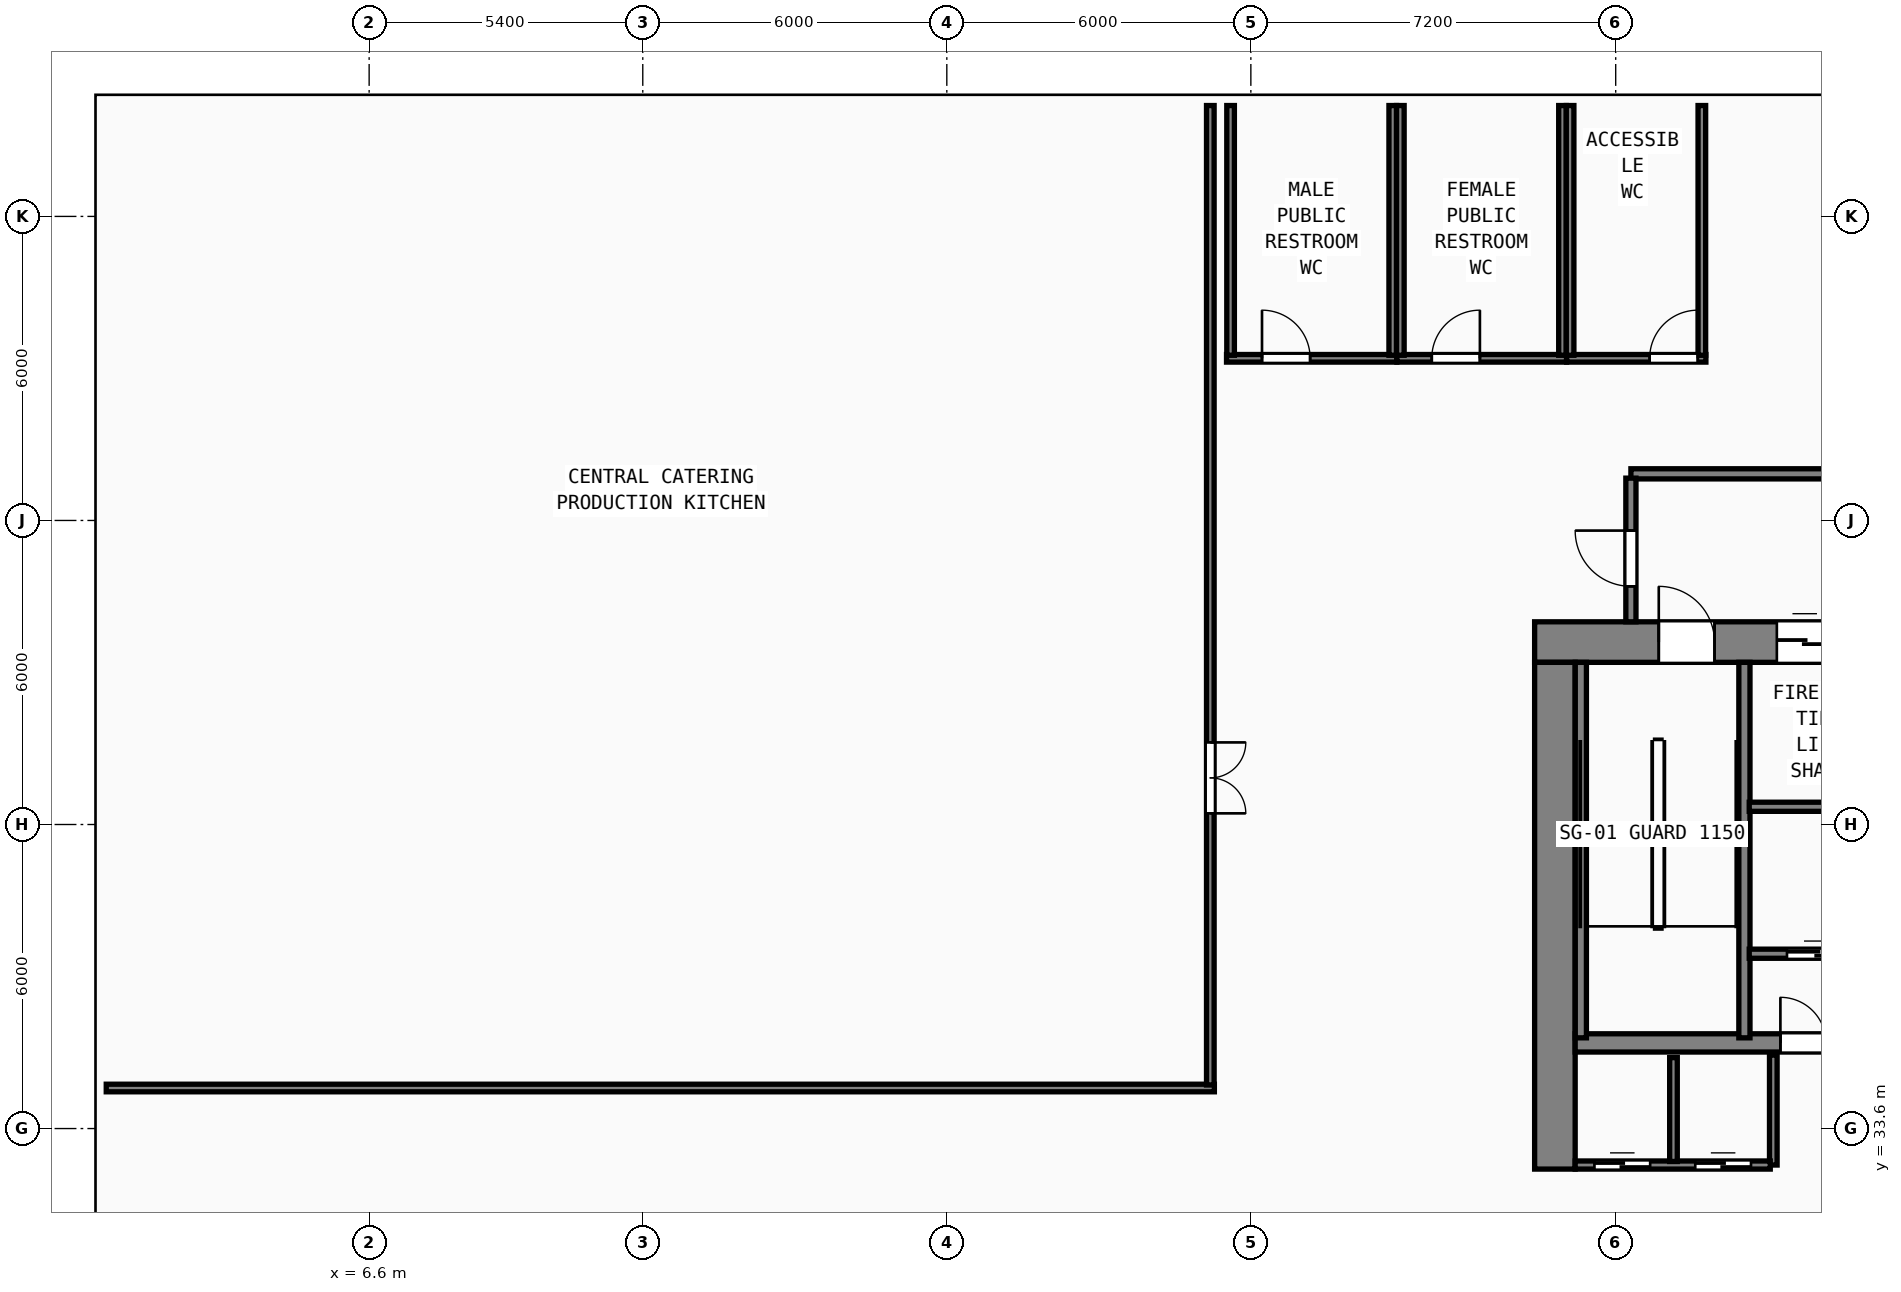
"""IFC4 building model, lengths in metres.
Left out: names, types, materials, properties, quantities, classifications, styles, units other than length and angle.
Written with IfcOpenShell. Run it as: python <this file> out.ifc"""

import sys

from ifc_helpers import new_model, si_unit, direction, frame, frame_2d, origin, origin_2d, place, context, subcontext, project, spatial, rectangle, hollow_rectangle, extrude, element, fill, save


model = new_model("IFC4")
c1 = context("Model", 3, precision=1e-05, world=origin(), true_north=direction((0.0, 1.0)))
c2 = subcontext(c1, "Body", "Model", "MODEL_VIEW")
j1 = project(units=[si_unit("LENGTHUNIT", "METRE"), si_unit("PLANEANGLEUNIT", "RADIAN")], contexts=[c1])
p1 = place(None, origin())
s1 = spatial("IfcSite", under=j1, at=p1, CompositionType="ELEMENT")
p2 = place(p1, origin())
s2 = spatial("IfcBuilding", under=s1, at=p2, CompositionType="ELEMENT")
p3 = place(p2, frame((0.0, 0.0, 5.4)))
s3 = spatial("IfcBuildingStorey", under=s2, at=p3, CompositionType="ELEMENT", Elevation=5.4)
p4 = place(p3, frame((29.6, 43.2, 0.0), z_axis=(0.0, 0.0, 1.0), x_axis=(1.0, 0.0, 0.0)))
e1 = element("IfcWall", 1, at=p4, inside=s3, PredefinedType="SHEAR", context=c2, shape_type="SweptSolid", body=[
    extrude(rectangle(XDim=17.6, YDim=0.8, at=frame_2d((8.8, 0.0))), origin(), (0.0, 0.0, 1.0), 4.56),
])
p5 = place(p4, frame((2.45, 0.0, 0.0)))
e2 = element("IfcOpeningElement", 2, at=p5, cuts=e1, PredefinedType="OPENING", context=c2, shape_type="SweptSolid", body=[
    extrude(rectangle(XDim=1.1, YDim=2.15, at=frame_2d((0.55, 1.075))), frame((0.0, 0.41, 0.0), z_axis=(0.0, -1.0, 0.0), x_axis=(1.0, 0.0, 0.0)), (0.0, 0.0, 1.0), 0.82),
])
p6 = place(p4, frame((7.56, 0.0, 0.0)))
e3 = element("IfcOpeningElement", 3, at=p6, cuts=e1, PredefinedType="OPENING", context=c2, shape_type="SweptSolid", body=[
    extrude(rectangle(XDim=1.1, YDim=2.15, at=frame_2d((0.55, 1.075))), frame((0.0, 0.41, 0.0), z_axis=(0.0, -1.0, 0.0), x_axis=(1.0, 0.0, 0.0)), (0.0, 0.0, 1.0), 0.82),
])
p7 = place(p4, frame((13.65, 0.0, 0.0)))
e4 = element("IfcOpeningElement", 4, at=p7, cuts=e1, PredefinedType="OPENING", context=c2, shape_type="SweptSolid", body=[
    extrude(rectangle(XDim=1.1, YDim=2.15, at=frame_2d((0.55, 1.075))), frame((0.0, 0.41, 0.0), z_axis=(0.0, -1.0, 0.0), x_axis=(1.0, 0.0, 0.0)), (0.0, 0.0, 1.0), 0.82),
])
p8 = place(p4, frame((4.78, 0.0, 0.0)))
e5 = element("IfcOpeningElement", 5, at=p8, cuts=e1, PredefinedType="OPENING", context=c2, shape_type="SweptSolid", body=[
    extrude(rectangle(XDim=1.1, YDim=2.2, at=frame_2d((0.55, 1.1))), frame((0.0, 0.41, 0.0), z_axis=(0.0, -1.0, 0.0), x_axis=(1.0, 0.0, 0.0)), (0.0, 0.0, 1.0), 0.82),
])
p9 = place(p4, frame((11.14, 0.0, 0.0)))
e6 = element("IfcOpeningElement", 6, at=p9, cuts=e1, PredefinedType="OPENING", context=c2, shape_type="SweptSolid", body=[
    extrude(rectangle(XDim=1.1, YDim=2.2, at=frame_2d((0.55, 1.1))), frame((0.0, 0.41, 0.0), z_axis=(0.0, -1.0, 0.0), x_axis=(1.0, 0.0, 0.0)), (0.0, 0.0, 1.0), 0.82),
])
p10 = place(p3, frame((30.0, 32.8, 0.0), z_axis=(0.0, 0.0, 1.0), x_axis=(0.0, 1.0, 0.0)))
e7 = element("IfcWall", 7, at=p10, inside=s3, PredefinedType="SHEAR", context=c2, shape_type="SweptSolid", body=[
    extrude(rectangle(XDim=10.0, YDim=0.8, at=frame_2d((5.0, 0.0))), origin(), (0.0, 0.0, 1.0), 4.56),
])
p11 = place(p3, frame((30.4, 35.29, 0.0), z_axis=(0.0, 0.0, 1.0), x_axis=(1.0, 0.0, 0.0)))
e8 = element("IfcWall", 8, at=p11, inside=s3, PredefinedType="SHEAR", context=c2, shape_type="SweptSolid", body=[
    extrude(rectangle(XDim=16.0, YDim=0.36, at=frame_2d((8.0, 0.0))), origin(), (0.0, 0.0, 1.0), 4.56),
])
p12 = place(p11, frame((4.95, 0.0, 0.0), z_axis=(0.0, 0.0, 1.0), x_axis=(-1.0, 0.0, 0.0)))
e9 = element("IfcOpeningElement", 9, at=p12, cuts=e8, PredefinedType="OPENING", context=c2, shape_type="SweptSolid", body=[
    extrude(rectangle(XDim=0.9, YDim=2.1, at=frame_2d((0.45, 1.05))), frame((0.0, 0.19, 0.0), z_axis=(0.0, -1.0, 0.0), x_axis=(1.0, 0.0, 0.0)), (0.0, 0.0, 1.0), 0.38),
])
p13 = place(p11, frame((12.01, 0.0, 0.0), z_axis=(0.0, 0.0, 1.0), x_axis=(-1.0, 0.0, 0.0)))
e10 = element("IfcOpeningElement", 10, at=p13, cuts=e8, PredefinedType="OPENING", context=c2, shape_type="SweptSolid", body=[
    extrude(rectangle(XDim=0.9, YDim=2.1, at=frame_2d((0.45, 1.05))), frame((0.0, 0.19, 0.0), z_axis=(0.0, -1.0, 0.0), x_axis=(1.0, 0.0, 0.0)), (0.0, 0.0, 1.0), 0.38),
])
for number, where, z_axis, x_axis in (
    (11, (30.512, 35.39, 0.0), (0.0, 0.0, 1.0), (0.0, 1.0, 0.0)),
    (12, (33.74, 35.39, 0.0), (0.0, 0.0, 1.0), (0.0, 1.0, 0.0)),
):
    element("IfcWall", number, at=place(p3, frame(where, z_axis=z_axis, x_axis=x_axis)), inside=s3, PredefinedType="SHEAR", context=c2, shape_type="SweptSolid", body=[
        extrude(rectangle(XDim=7.41, YDim=0.22, at=frame_2d((3.705, 0.0))), origin(), (0.0, 0.0, 1.0), 4.56),
    ])
for number, where, z_axis, x_axis in (
    (13, (24.0, 33.6, 0.0), (0.0, 0.0, 1.0), (1.0, 0.0, 0.0)),
    (14, (24.0, 45.6, 0.0), (0.0, 0.0, 1.0), (1.0, 0.0, 0.0)),
    (15, (31.2, 50.4, 0.0), (0.0, 0.0, 1.0), (1.0, 0.0, 0.0)),
    (16, (12.6, 38.4, 0.0), (0.0, 0.0, 1.0), (1.0, 0.0, 0.0)),
):
    element("IfcColumn", number, at=place(p3, frame(where, z_axis=z_axis, x_axis=x_axis)), inside=s3, PredefinedType="COLUMN", context=c2, shape_type="SweptSolid", body=[
        extrude(hollow_rectangle(XDim=1.3, YDim=1.3, WallThickness=0.048, at=origin_2d()), origin(), (0.0, 0.0, 1.0), 4.8),
    ])
for number, where, z_axis, x_axis in (
    (17, (6.6, 51.6, 0.0), (0.0, 0.0, 1.0), (1.0, 0.0, 0.0)),
    (18, (18.0, 51.6, 0.0), (0.0, 0.0, 1.0), (1.0, 0.0, 0.0)),
):
    element("IfcColumn", number, at=place(p3, frame(where, z_axis=z_axis, x_axis=x_axis)), inside=s3, PredefinedType="COLUMN", context=c2, shape_type="SweptSolid", body=[
        extrude(rectangle(XDim=0.9, YDim=0.9, at=origin_2d()), origin(), (0.0, 0.0, 1.0), 4.8),
    ])
p14 = place(p3, frame((31.5, 46.52, 0.0), z_axis=(0.0, 0.0, 1.0), x_axis=(1.0, 0.0, 0.0)))
e19 = element("IfcWall", 19, at=p14, inside=s3, PredefinedType="SOLIDWALL", context=c2, shape_type="SweptSolid", body=[
    extrude(rectangle(XDim=13.8, YDim=0.2, at=frame_2d((6.9, 0.0))), origin(), (0.0, 0.0, 1.0), 4.56),
])
p15 = place(p3, frame((31.5, 43.6, 0.0), z_axis=(0.0, 0.0, 1.0), x_axis=(0.0, 1.0, 0.0)))
e20 = element("IfcWall", 20, at=p15, inside=s3, PredefinedType="SOLIDWALL", context=c2, shape_type="SweptSolid", body=[
    extrude(rectangle(XDim=2.835, YDim=0.2, at=frame_2d((1.417, 0.0))), origin(), (0.0, 0.0, 1.0), 4.56),
])
p16 = place(p15, frame((1.8, 0.0, 0.0), z_axis=(0.0, 0.0, 1.0), x_axis=(-1.0, 0.0, 0.0)))
e21 = element("IfcOpeningElement", 21, at=p16, cuts=e20, PredefinedType="OPENING", context=c2, shape_type="SweptSolid", body=[
    extrude(rectangle(XDim=1.1, YDim=2.15, at=frame_2d((0.55, 1.075))), frame((0.0, 0.11, 0.0), z_axis=(0.0, -1.0, 0.0), x_axis=(1.0, 0.0, 0.0)), (0.0, 0.0, 1.0), 0.22),
])
p17 = place(p3, frame((33.835, 39.95, 0.0), z_axis=(0.0, 0.0, 1.0), x_axis=(1.0, 0.0, 0.0)))
e22 = element("IfcWall", 22, at=p17, inside=s3, PredefinedType="SOLIDWALL", context=c2, shape_type="SweptSolid", body=[
    extrude(rectangle(XDim=2.77, YDim=0.18, at=frame_2d((1.385, 0.0))), origin(), (0.0, 0.0, 1.0), 4.56),
])
p18 = place(p3, frame((33.835, 37.05, 0.0), z_axis=(0.0, 0.0, 1.0), x_axis=(1.0, 0.0, 0.0)))
e23 = element("IfcWall", 23, at=p18, inside=s3, PredefinedType="SOLIDWALL", context=c2, shape_type="SweptSolid", body=[
    extrude(rectangle(XDim=2.77, YDim=0.18, at=frame_2d((1.385, 0.0))), origin(), (0.0, 0.0, 1.0), 4.56),
])
p19 = place(p18, frame((1.945, 0.0, 0.0), z_axis=(0.0, 0.0, 1.0), x_axis=(-1.0, 0.0, 0.0)))
e24 = element("IfcOpeningElement", 24, at=p19, cuts=e23, PredefinedType="OPENING", context=c2, shape_type="SweptSolid", body=[
    extrude(rectangle(XDim=1.2, YDim=2.2, at=frame_2d((0.6, 1.1))), frame((0.0, 0.1, 0.0), z_axis=(0.0, -1.0, 0.0), x_axis=(1.0, 0.0, 0.0)), (0.0, 0.0, 1.0), 0.2),
])
p20 = place(p3, frame((34.31, 32.88, 0.0), z_axis=(0.0, 0.0, 1.0), x_axis=(0.0, 1.0, 0.0)))
e25 = element("IfcWall", 25, at=p20, inside=s3, PredefinedType="SOLIDWALL", context=c2, shape_type="SweptSolid", body=[
    extrude(rectangle(XDim=2.17, YDim=0.15, at=frame_2d((1.085, 0.0))), origin(), (0.0, 0.0, 1.0), 4.56),
])
p21 = place(p3, frame((30.4, 32.88, 0.0), z_axis=(0.0, 0.0, 1.0), x_axis=(1.0, 0.0, 0.0)))
e26 = element("IfcWall", 26, at=p21, inside=s3, PredefinedType="SOLIDWALL", context=c2, shape_type="SweptSolid", body=[
    extrude(rectangle(XDim=3.85, YDim=0.16, at=frame_2d((1.925, 0.0))), origin(), (0.0, 0.0, 1.0), 4.56),
])
p22 = place(p21, frame((1.48, 0.0, 0.0), z_axis=(0.0, 0.0, 1.0), x_axis=(-1.0, 0.0, 0.0)))
e27 = element("IfcOpeningElement", 27, at=p22, cuts=e26, PredefinedType="OPENING", context=c2, shape_type="SweptSolid", body=[
    extrude(rectangle(XDim=1.1, YDim=2.2, at=frame_2d((0.55, 1.1))), frame((0.0, 0.09, 0.0), z_axis=(0.0, -1.0, 0.0), x_axis=(1.0, 0.0, 0.0)), (0.0, 0.0, 1.0), 0.18),
])
p23 = place(p21, frame((3.47, 0.0, 0.0), z_axis=(0.0, 0.0, 1.0), x_axis=(-1.0, 0.0, 0.0)))
e28 = element("IfcOpeningElement", 28, at=p23, cuts=e26, PredefinedType="OPENING", context=c2, shape_type="SweptSolid", body=[
    extrude(rectangle(XDim=1.1, YDim=2.2, at=frame_2d((0.55, 1.1))), frame((0.0, 0.09, 0.0), z_axis=(0.0, -1.0, 0.0), x_axis=(1.0, 0.0, 0.0)), (0.0, 0.0, 1.0), 0.18),
])
p24 = place(p3, frame((32.34, 32.95, 0.0), z_axis=(0.0, 0.0, 1.0), x_axis=(0.0, 1.0, 0.0)))
e29 = element("IfcWall", 29, at=p24, inside=s3, PredefinedType="SOLIDWALL", context=c2, shape_type="SweptSolid", body=[
    extrude(rectangle(XDim=2.05, YDim=0.15, at=frame_2d((1.025, 0.0))), origin(), (0.0, 0.0, 1.0), 4.56),
])
p25 = place(p3, frame((23.52, 48.8, 0.0), z_axis=(0.0, 0.0, 1.0), x_axis=(1.0, 0.0, 0.0)))
e30 = element("IfcWall", 30, at=p25, inside=s3, PredefinedType="PARTITIONING", context=c2, shape_type="SweptSolid", body=[
    extrude(rectangle(XDim=3.36, YDim=0.15, at=frame_2d((1.68, 0.0))), origin(), (0.0, 0.0, 1.0), 4.56),
])
p26 = place(p25, frame((0.7, 0.0, 0.0)))
e31 = element("IfcOpeningElement", 31, at=p26, cuts=e30, PredefinedType="OPENING", context=c2, shape_type="SweptSolid", body=[
    extrude(rectangle(XDim=0.95, YDim=2.12, at=frame_2d((0.475, 1.06))), frame((0.0, 0.085, 0.0), z_axis=(0.0, -1.0, 0.0), x_axis=(1.0, 0.0, 0.0)), (0.0, 0.0, 1.0), 0.17),
])
for number, where, z_axis, x_axis in (
    (32, (23.6, 48.86, 0.0), (0.0, 0.0, 1.0), (0.0, 1.0, 0.0)),
    (33, (26.8, 48.86, 0.0), (0.0, 0.0, 1.0), (0.0, 1.0, 0.0)),
):
    element("IfcWall", number, at=place(p3, frame(where, z_axis=z_axis, x_axis=x_axis)), inside=s3, PredefinedType="PARTITIONING", context=c2, shape_type="SweptSolid", body=[
        extrude(rectangle(XDim=4.928, YDim=0.15, at=frame_2d((2.464, 0.0))), origin(), (0.0, 0.0, 1.0), 4.56),
    ])
p27 = place(p3, frame((26.882, 48.8, 0.0), z_axis=(0.0, 0.0, 1.0), x_axis=(1.0, 0.0, 0.0)))
e34 = element("IfcWall", 34, at=p27, inside=s3, PredefinedType="PARTITIONING", context=c2, shape_type="SweptSolid", body=[
    extrude(rectangle(XDim=3.348, YDim=0.15, at=frame_2d((1.674, 0.0))), origin(), (0.0, 0.0, 1.0), 4.56),
])
p28 = place(p27, frame((0.688, 0.0, 0.0)))
e35 = element("IfcOpeningElement", 35, at=p28, cuts=e34, PredefinedType="OPENING", context=c2, shape_type="SweptSolid", body=[
    extrude(rectangle(XDim=0.95, YDim=2.12, at=frame_2d((0.475, 1.06))), frame((0.0, 0.085, 0.0), z_axis=(0.0, -1.0, 0.0), x_axis=(1.0, 0.0, 0.0)), (0.0, 0.0, 1.0), 0.17),
])
for number, where, z_axis, x_axis in (
    (36, (26.95, 48.86, 0.0), (0.0, 0.0, 1.0), (0.0, 1.0, 0.0)),
    (37, (30.15, 48.86, 0.0), (0.0, 0.0, 1.0), (0.0, 1.0, 0.0)),
):
    element("IfcWall", number, at=place(p3, frame(where, z_axis=z_axis, x_axis=x_axis)), inside=s3, PredefinedType="PARTITIONING", context=c2, shape_type="SweptSolid", body=[
        extrude(rectangle(XDim=4.928, YDim=0.15, at=frame_2d((2.464, 0.0))), origin(), (0.0, 0.0, 1.0), 4.56),
    ])
p29 = place(p3, frame((30.232, 48.8, 0.0), z_axis=(0.0, 0.0, 1.0), x_axis=(1.0, 0.0, 0.0)))
e38 = element("IfcWall", 38, at=p29, inside=s3, PredefinedType="PARTITIONING", context=c2, shape_type="SweptSolid", body=[
    extrude(rectangle(XDim=2.748, YDim=0.15, at=frame_2d((1.374, 0.0))), origin(), (0.0, 0.0, 1.0), 4.56),
])
p30 = place(p29, frame((1.638, 0.0, 0.0)))
e39 = element("IfcOpeningElement", 39, at=p30, cuts=e38, PredefinedType="OPENING", context=c2, shape_type="SweptSolid", body=[
    extrude(rectangle(XDim=0.95, YDim=2.12, at=frame_2d((0.475, 1.06))), frame((0.0, 0.085, 0.0), z_axis=(0.0, -1.0, 0.0), x_axis=(1.0, 0.0, 0.0)), (0.0, 0.0, 1.0), 0.17),
])
for number, where, z_axis, x_axis in (
    (40, (30.3, 48.86, 0.0), (0.0, 0.0, 1.0), (0.0, 1.0, 0.0)),
    (41, (32.9, 48.86, 0.0), (0.0, 0.0, 1.0), (0.0, 1.0, 0.0)),
):
    element("IfcWall", number, at=place(p3, frame(where, z_axis=z_axis, x_axis=x_axis)), inside=s3, PredefinedType="PARTITIONING", context=c2, shape_type="SweptSolid", body=[
        extrude(rectangle(XDim=4.928, YDim=0.15, at=frame_2d((2.464, 0.0))), origin(), (0.0, 0.0, 1.0), 4.56),
    ])
p31 = place(p3, frame((1.412, 34.4, 0.0), z_axis=(0.0, 0.0, 1.0), x_axis=(1.0, 0.0, 0.0)))
e42 = element("IfcWall", 42, at=p31, inside=s3, PredefinedType="PARTITIONING", context=c2, shape_type="SweptSolid", body=[
    extrude(rectangle(XDim=21.868, YDim=0.15, at=frame_2d((10.934, 0.0))), origin(), (0.0, 0.0, 1.0), 4.56),
])
p32 = place(p3, frame((23.2, 34.46, 0.0), z_axis=(0.0, 0.0, 1.0), x_axis=(0.0, 1.0, 0.0)))
e43 = element("IfcWall", 43, at=p32, inside=s3, PredefinedType="PARTITIONING", context=c2, shape_type="SweptSolid", body=[
    extrude(rectangle(XDim=19.328, YDim=0.15, at=frame_2d((9.664, 0.0))), origin(), (0.0, 0.0, 1.0), 4.56),
])
p33 = place(p32, frame((6.76, 0.0, 0.0), z_axis=(0.0, 0.0, 1.0), x_axis=(-1.0, 0.0, 0.0)))
e44 = element("IfcOpeningElement", 44, at=p33, cuts=e43, PredefinedType="OPENING", context=c2, shape_type="SweptSolid", body=[
    extrude(rectangle(XDim=1.4, YDim=2.18, at=frame_2d((0.7, 1.09))), frame((0.0, 0.085, 0.0), z_axis=(0.0, -1.0, 0.0), x_axis=(1.0, 0.0, 0.0)), (0.0, 0.0, 1.0), 0.17),
])
p34 = place(p5, origin())
e45 = element("IfcDoor", 45, at=p34, inside=s3, OperationType="SINGLE_SWING_LEFT", PredefinedType="DOOR", context=c2, shape_type="SweptSolid", body=[
    extrude(rectangle(XDim=1.1, YDim=2.15, at=frame_2d((0.55, 1.075))), frame((0.0, 0.185, 0.0), z_axis=(0.0, -1.0, 0.0), x_axis=(1.0, 0.0, 0.0)), (0.0, 0.0, 1.0), 0.05),
])
fill(e2, e45)
p35 = place(p16, origin())
e46 = element("IfcDoor", 46, at=p35, inside=s3, OperationType="SINGLE_SWING_LEFT", PredefinedType="DOOR", context=c2, shape_type="SweptSolid", body=[
    extrude(rectangle(XDim=1.1, YDim=2.15, at=frame_2d((0.55, 1.075))), frame((0.0, 0.025, 0.0), z_axis=(0.0, -1.0, 0.0), x_axis=(1.0, 0.0, 0.0)), (0.0, 0.0, 1.0), 0.05),
])
fill(e21, e46)
p36 = place(p8, origin())
e47 = element("IfcDoor", 47, at=p36, inside=s3, OperationType="SLIDING_TO_LEFT", PredefinedType="DOOR", context=c2, shape_type="SweptSolid", body=[
    extrude(rectangle(XDim=1.1, YDim=2.2, at=frame_2d((0.55, 1.1))), frame((0.0, 0.185, 0.0), z_axis=(0.0, -1.0, 0.0), x_axis=(1.0, 0.0, 0.0)), (0.0, 0.0, 1.0), 0.05),
])
fill(e5, e47)
p37 = place(p19, origin())
e48 = element("IfcDoor", 48, at=p37, inside=s3, OperationType="SLIDING_TO_RIGHT", PredefinedType="DOOR", context=c2, shape_type="SweptSolid", body=[
    extrude(rectangle(XDim=1.2, YDim=2.2, at=frame_2d((0.6, 1.1))), frame((0.0, 0.025, 0.0), z_axis=(0.0, -1.0, 0.0), x_axis=(1.0, 0.0, 0.0)), (0.0, 0.0, 1.0), 0.05),
])
fill(e24, e48)
p38 = place(p12, origin())
e49 = element("IfcDoor", 49, at=p38, inside=s3, OperationType="SINGLE_SWING_RIGHT", PredefinedType="DOOR", context=c2, shape_type="SweptSolid", body=[
    extrude(rectangle(XDim=0.9, YDim=2.1, at=frame_2d((0.45, 1.05))), frame((0.0, 0.025, 0.0), z_axis=(0.0, -1.0, 0.0), x_axis=(1.0, 0.0, 0.0)), (0.0, 0.0, 1.0), 0.05),
])
fill(e9, e49)
p39 = place(p22, origin())
e50 = element("IfcDoor", 50, at=p39, inside=s3, OperationType="SLIDING_TO_LEFT", PredefinedType="DOOR", context=c2, shape_type="SweptSolid", body=[
    extrude(rectangle(XDim=1.1, YDim=2.2, at=frame_2d((0.55, 1.1))), frame((0.0, 0.025, 0.0), z_axis=(0.0, -1.0, 0.0), x_axis=(1.0, 0.0, 0.0)), (0.0, 0.0, 1.0), 0.05),
])
fill(e27, e50)
p40 = place(p23, origin())
e51 = element("IfcDoor", 51, at=p40, inside=s3, OperationType="SLIDING_TO_LEFT", PredefinedType="DOOR", context=c2, shape_type="SweptSolid", body=[
    extrude(rectangle(XDim=1.1, YDim=2.2, at=frame_2d((0.55, 1.1))), frame((0.0, 0.025, 0.0), z_axis=(0.0, -1.0, 0.0), x_axis=(1.0, 0.0, 0.0)), (0.0, 0.0, 1.0), 0.05),
])
fill(e28, e51)
p41 = place(p26, origin())
e52 = element("IfcDoor", 52, at=p41, inside=s3, OperationType="SINGLE_SWING_LEFT", PredefinedType="DOOR", context=c2, shape_type="SweptSolid", body=[
    extrude(rectangle(XDim=0.95, YDim=2.12, at=frame_2d((0.475, 1.06))), frame((0.0, 0.025, 0.0), z_axis=(0.0, -1.0, 0.0), x_axis=(1.0, 0.0, 0.0)), (0.0, 0.0, 1.0), 0.05),
])
fill(e31, e52)
p42 = place(p28, origin())
e53 = element("IfcDoor", 53, at=p42, inside=s3, OperationType="SINGLE_SWING_RIGHT", PredefinedType="DOOR", context=c2, shape_type="SweptSolid", body=[
    extrude(rectangle(XDim=0.95, YDim=2.12, at=frame_2d((0.475, 1.06))), frame((0.0, 0.025, 0.0), z_axis=(0.0, -1.0, 0.0), x_axis=(1.0, 0.0, 0.0)), (0.0, 0.0, 1.0), 0.05),
])
fill(e35, e53)
p43 = place(p30, origin())
e54 = element("IfcDoor", 54, at=p43, inside=s3, OperationType="SINGLE_SWING_RIGHT", PredefinedType="DOOR", context=c2, shape_type="SweptSolid", body=[
    extrude(rectangle(XDim=0.95, YDim=2.12, at=frame_2d((0.475, 1.06))), frame((0.0, 0.025, 0.0), z_axis=(0.0, -1.0, 0.0), x_axis=(1.0, 0.0, 0.0)), (0.0, 0.0, 1.0), 0.05),
])
fill(e39, e54)
p44 = place(p33, origin())
e55 = element("IfcDoor", 55, at=p44, inside=s3, OperationType="DOUBLE_DOOR_SINGLE_SWING", PredefinedType="DOOR", context=c2, shape_type="SweptSolid", body=[
    extrude(rectangle(XDim=1.4, YDim=2.18, at=frame_2d((0.7, 1.09))), frame((0.0, 0.025, 0.0), z_axis=(0.0, -1.0, 0.0), x_axis=(1.0, 0.0, 0.0)), (0.0, 0.0, 1.0), 0.05),
])
fill(e44, e55)
save(model, sys.argv[1])
